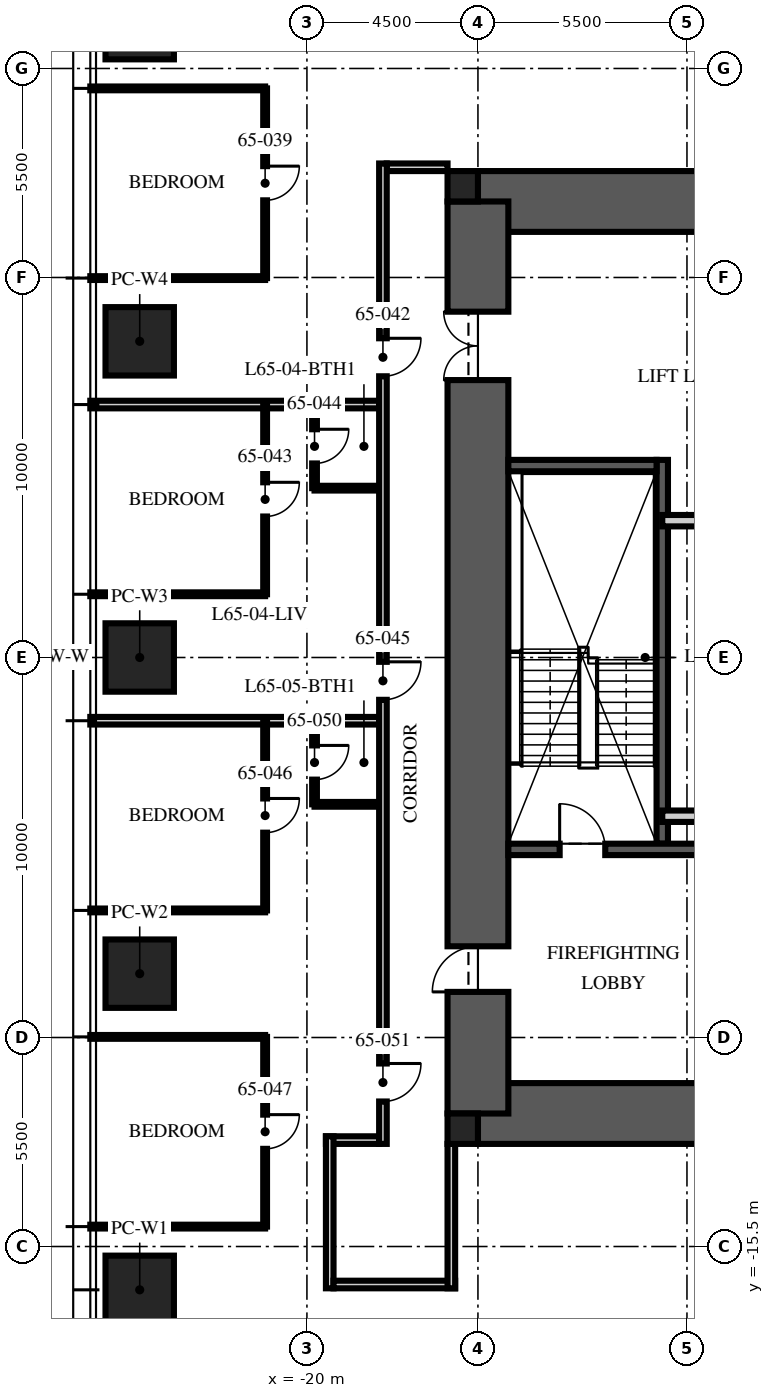
"""IFC4 building model, lengths in metres.
Left out: names, types, materials, properties, quantities, classifications, styles, units other than length and angle.
Written with IfcOpenShell. Run it as: python <this file> out.ifc"""

import sys

from ifc_helpers import new_model, si_unit, direction, frame, frame_2d, origin, origin_2d, place, context, subcontext, project, spatial, rectangle, extrude, element, fill, save


model = new_model("IFC4")
c1 = context("Model", 3, precision=1e-05, world=origin(), true_north=direction((0.0, 1.0)))
c2 = subcontext(c1, "Body", "Model", "MODEL_VIEW")
j1 = project(units=[si_unit("LENGTHUNIT", "METRE"), si_unit("PLANEANGLEUNIT", "RADIAN")], contexts=[c1])
p1 = place(None, origin())
s1 = spatial("IfcSite", under=j1, at=p1, CompositionType="ELEMENT")
p2 = place(p1, origin())
s2 = spatial("IfcBuilding", under=s1, at=p2, CompositionType="ELEMENT")
p3 = place(p2, frame((0.0, 0.0, 259.5)))
s3 = spatial("IfcBuildingStorey", under=s2, at=p3, CompositionType="ELEMENT", Elevation=259.5)
for number, where, z_axis, x_axis in (
    (1, (-15.5, 12.0, -0.25), (0.0, 0.0, 1.0), (1.0, 0.0, 0.0)),
    (2, (-15.5, -12.0, -0.25), (0.0, 0.0, 1.0), (1.0, 0.0, 0.0)),
):
    element("IfcWall", number, at=place(p3, frame(where, z_axis=z_axis, x_axis=x_axis)), inside=s3, PredefinedType="SHEAR", context=c2, shape_type="SweptSolid", body=[
        extrude(rectangle(XDim=31.0, YDim=1.6, at=frame_2d((15.5, 0.0))), origin(), (0.0, 0.0, 1.0), 3.75),
    ])
p4 = place(p3, frame((-15.5, -12.0, -0.25), z_axis=(0.0, 0.0, 1.0), x_axis=(0.0, 1.0, 0.0)))
e3 = element("IfcWall", 3, at=p4, inside=s3, PredefinedType="SHEAR", context=c2, shape_type="SweptSolid", body=[
    extrude(rectangle(XDim=24.0, YDim=1.6, at=frame_2d((12.0, 0.0))), origin(), (0.0, 0.0, 1.0), 3.75),
])
p5 = place(p4, frame((3.2, 0.0, 0.25)))
e4 = element("IfcOpeningElement", 4, at=p5, cuts=e3, PredefinedType="OPENING", context=c2, shape_type="SweptSolid", body=[
    extrude(rectangle(XDim=1.2, YDim=2.1, at=frame_2d((0.6, 1.05))), frame((0.0, 0.81, 0.0), z_axis=(0.0, -1.0, 0.0), x_axis=(1.0, 0.0, 0.0)), (0.0, 0.0, 1.0), 1.62),
])
p6 = place(p4, frame((19.3, 0.0, 0.25)))
e5 = element("IfcOpeningElement", 5, at=p6, cuts=e3, PredefinedType="OPENING", context=c2, shape_type="SweptSolid", body=[
    extrude(rectangle(XDim=1.8, YDim=2.1, at=frame_2d((0.9, 1.05))), frame((0.0, 0.81, 0.0), z_axis=(0.0, -1.0, 0.0), x_axis=(1.0, 0.0, 0.0)), (0.0, 0.0, 1.0), 1.62),
])
for number, where, z_axis, x_axis in (
    (6, (-15.9, 12.4, -0.25), (0.0, 0.0, 1.0), (1.0, 0.0, 0.0)),
    (7, (-15.9, -12.4, -0.25), (0.0, 0.0, 1.0), (1.0, 0.0, 0.0)),
):
    element("IfcColumn", number, at=place(p3, frame(where, z_axis=z_axis, x_axis=x_axis)), inside=s3, PredefinedType="COLUMN", context=c2, shape_type="SweptSolid", body=[
        extrude(rectangle(XDim=0.8, YDim=0.8, at=origin_2d()), origin(), (0.0, 0.0, 1.0), 3.75),
    ])
for number, where, z_axis, x_axis in (
    (8, (-24.4, -16.64, 0.0), (0.0, 0.0, 1.0), (0.0, 1.0, 0.0)),
    (9, (-24.4, -8.32, 0.0), (0.0, 0.0, 1.0), (0.0, 1.0, 0.0)),
    (10, (-24.4, 0.0, 0.0), (0.0, 0.0, 1.0), (0.0, 1.0, 0.0)),
    (11, (-24.4, 8.32, 0.0), (0.0, 0.0, 1.0), (0.0, 1.0, 0.0)),
    (12, (-24.4, 16.64, 0.0), (0.0, 0.0, 1.0), (0.0, 1.0, 0.0)),
):
    element("IfcColumn", number, at=place(p3, frame(where, z_axis=z_axis, x_axis=x_axis)), inside=s3, PredefinedType="COLUMN", context=c2, shape_type="SweptSolid", body=[
        extrude(rectangle(XDim=1.8, YDim=1.8, at=origin_2d()), origin(), (0.0, 0.0, 1.0), 3.75),
    ])
p7 = place(p3, frame((-10.65, -4.9, 0.0), z_axis=(0.0, 0.0, 1.0), x_axis=(0.0, 1.0, 0.0)))
e13 = element("IfcWall", 13, at=p7, inside=s3, PredefinedType="SOLIDWALL", context=c2, shape_type="SweptSolid", body=[
    extrude(rectangle(XDim=10.1, YDim=0.3, at=frame_2d((5.05, 0.0))), origin(), (0.0, 0.0, 1.0), 3.5),
])
p8 = place(p3, frame((-14.7, -5.05, 0.0), z_axis=(0.0, 0.0, 1.0), x_axis=(1.0, 0.0, 0.0)))
e14 = element("IfcWall", 14, at=p8, inside=s3, PredefinedType="SOLIDWALL", context=c2, shape_type="SweptSolid", body=[
    extrude(rectangle(XDim=5.9, YDim=0.3, at=frame_2d((2.95, 0.0))), origin(), (0.0, 0.0, 1.0), 3.5),
])
p9 = place(p8, frame((1.35, 0.0, 0.0)))
e15 = element("IfcOpeningElement", 15, at=p9, cuts=e14, PredefinedType="OPENING", context=c2, shape_type="SweptSolid", body=[
    extrude(rectangle(XDim=1.2, YDim=2.1, at=frame_2d((0.6, 1.05))), frame((0.0, 0.16, 0.0), z_axis=(0.0, -1.0, 0.0), x_axis=(1.0, 0.0, 0.0)), (0.0, 0.0, 1.0), 0.32),
])
p10 = place(p3, frame((-14.7, 5.05, 0.0), z_axis=(0.0, 0.0, 1.0), x_axis=(1.0, 0.0, 0.0)))
e16 = element("IfcWall", 16, at=p10, inside=s3, PredefinedType="SOLIDWALL", context=c2, shape_type="SweptSolid", body=[
    extrude(rectangle(XDim=3.9, YDim=0.3, at=frame_2d((1.95, 0.0))), origin(), (0.0, 0.0, 1.0), 3.5),
])
p11 = place(p3, frame((-10.65, 3.6, 0.0), z_axis=(0.0, 0.0, 1.0), x_axis=(1.0, 0.0, 0.0)))
e17 = element("IfcWall", 17, at=p11, inside=s3, PredefinedType="PARTITIONING", context=c2, shape_type="SweptSolid", body=[
    extrude(rectangle(XDim=21.3, YDim=0.3, at=frame_2d((10.65, 0.0))), origin(), (0.0, 0.0, 1.0), 3.5),
])
p12 = place(p11, frame((10.05, 0.0, 0.0)))
e18 = element("IfcOpeningElement", 18, at=p12, cuts=e17, PredefinedType="OPENING", context=c2, shape_type="SweptSolid", body=[
    extrude(rectangle(XDim=1.2, YDim=2.1, at=frame_2d((0.6, 1.05))), frame((0.0, 0.16, 0.0), z_axis=(0.0, -1.0, 0.0), x_axis=(1.0, 0.0, 0.0)), (0.0, 0.0, 1.0), 0.32),
])
p13 = place(p11, frame((19.238, 0.0, 0.0)))
e19 = element("IfcOpeningElement", 19, at=p13, cuts=e17, PredefinedType="OPENING", context=c2, shape_type="SweptSolid", body=[
    extrude(rectangle(XDim=0.9, YDim=2.1, at=frame_2d((0.45, 1.05))), frame((0.0, 0.16, 0.0), z_axis=(0.0, -1.0, 0.0), x_axis=(1.0, 0.0, 0.0)), (0.0, 0.0, 1.0), 0.32),
])
p14 = place(p3, frame((-10.65, -4.177, 0.0), z_axis=(0.0, 0.0, 1.0), x_axis=(1.0, 0.0, 0.0)))
e20 = element("IfcWall", 20, at=p14, inside=s3, PredefinedType="PARTITIONING", context=c2, shape_type="SweptSolid", body=[
    extrude(rectangle(XDim=6.45, YDim=0.3, at=frame_2d((3.225, 0.0))), origin(), (0.0, 0.0, 1.0), 3.5),
])
p15 = place(p3, frame((-18.1, -12.7, 0.0), z_axis=(0.0, 0.0, 1.0), x_axis=(-1.0, 0.0, 0.0)))
e21 = element("IfcWall", 21, at=p15, inside=s3, PredefinedType="PARTITIONING", context=c2, shape_type="SweptSolid", body=[
    extrude(rectangle(XDim=1.4, YDim=0.2, at=frame_2d((0.7, 0.0))), origin(), (0.0, 0.0, 1.0), 2.81),
])
p16 = place(p3, frame((-19.4, -12.6, 0.0), z_axis=(0.0, 0.0, 1.0), x_axis=(0.0, -1.0, 0.0)))
e22 = element("IfcWall", 22, at=p16, inside=s3, PredefinedType="PARTITIONING", context=c2, shape_type="SweptSolid", body=[
    extrude(rectangle(XDim=4.0, YDim=0.2, at=frame_2d((2.0, 0.0))), origin(), (0.0, 0.0, 1.0), 2.6),
])
p17 = place(p3, frame((-19.3, -16.5, 0.0), z_axis=(0.0, 0.0, 1.0), x_axis=(1.0, 0.0, 0.0)))
e23 = element("IfcWall", 23, at=p17, inside=s3, PredefinedType="PARTITIONING", context=c2, shape_type="SweptSolid", body=[
    extrude(rectangle(XDim=3.2, YDim=0.2, at=frame_2d((1.6, 0.0))), origin(), (0.0, 0.0, 1.0), 2.3),
])
p18 = place(p3, frame((-16.2, -16.6, 0.0), z_axis=(0.0, 0.0, 1.0), x_axis=(0.0, 1.0, 0.0)))
e24 = element("IfcWall", 24, at=p18, inside=s3, PredefinedType="PARTITIONING", context=c2, shape_type="SweptSolid", body=[
    extrude(rectangle(XDim=3.8, YDim=0.2, at=frame_2d((1.9, 0.0))), origin(), (0.0, 0.0, 1.0), 2.3),
])
p19 = place(p3, frame((-16.3, 12.9, 0.0), z_axis=(0.0, 0.0, 1.0), x_axis=(-1.0, 0.0, 0.0)))
e25 = element("IfcWall", 25, at=p19, inside=s3, PredefinedType="PARTITIONING", context=c2, shape_type="SweptSolid", body=[
    extrude(rectangle(XDim=1.6, YDim=0.2, at=frame_2d((0.8, 0.0))), origin(), (0.0, 0.0, 1.0), 2.3),
])
for number, where, z_axis, x_axis in (
    (26, (-21.1, 14.976, 0.0), (0.0, 0.0, 1.0), (-1.0, 0.0, 0.0)),
    (27, (-21.1, 9.984, 0.0), (0.0, 0.0, 1.0), (-1.0, 0.0, 0.0)),
):
    element("IfcWall", number, at=place(p3, frame(where, z_axis=z_axis, x_axis=x_axis)), inside=s3, PredefinedType="PARTITIONING", context=c2, shape_type="SweptSolid", body=[
        extrude(rectangle(XDim=4.6, YDim=0.1, at=frame_2d((2.3, 0.0))), origin(), (0.0, 0.0, 1.0), 2.91),
    ])
p20 = place(p3, frame((-18.1, 6.656, 0.0), z_axis=(0.0, 0.0, 1.0), x_axis=(-1.0, 0.0, 0.0)))
e28 = element("IfcWall", 28, at=p20, inside=s3, PredefinedType="PARTITIONING", context=c2, shape_type="SweptSolid", body=[
    extrude(rectangle(XDim=7.6, YDim=0.2, at=frame_2d((3.8, 0.0))), origin(), (0.0, 0.0, 1.0), 2.91),
])
p21 = place(p3, frame((-21.1, 1.664, 0.0), z_axis=(0.0, 0.0, 1.0), x_axis=(-1.0, 0.0, 0.0)))
e29 = element("IfcWall", 29, at=p21, inside=s3, PredefinedType="PARTITIONING", context=c2, shape_type="SweptSolid", body=[
    extrude(rectangle(XDim=4.6, YDim=0.1, at=frame_2d((2.3, 0.0))), origin(), (0.0, 0.0, 1.0), 2.91),
])
p22 = place(p3, frame((-18.1, -1.664, 0.0), z_axis=(0.0, 0.0, 1.0), x_axis=(-1.0, 0.0, 0.0)))
e30 = element("IfcWall", 30, at=p22, inside=s3, PredefinedType="PARTITIONING", context=c2, shape_type="SweptSolid", body=[
    extrude(rectangle(XDim=7.6, YDim=0.2, at=frame_2d((3.8, 0.0))), origin(), (0.0, 0.0, 1.0), 2.91),
])
for number, where, z_axis, x_axis in (
    (31, (-21.1, -6.656, 0.0), (0.0, 0.0, 1.0), (-1.0, 0.0, 0.0)),
    (32, (-21.1, -9.984, 0.0), (0.0, 0.0, 1.0), (-1.0, 0.0, 0.0)),
    (33, (-21.1, -14.976, 0.0), (0.0, 0.0, 1.0), (-1.0, 0.0, 0.0)),
):
    element("IfcWall", number, at=place(p3, frame(where, z_axis=z_axis, x_axis=x_axis)), inside=s3, PredefinedType="PARTITIONING", context=c2, shape_type="SweptSolid", body=[
        extrude(rectangle(XDim=4.6, YDim=0.1, at=frame_2d((2.3, 0.0))), origin(), (0.0, 0.0, 1.0), 2.91),
    ])
p23 = place(p3, frame((-21.1, 14.976, 0.0), z_axis=(0.0, 0.0, 1.0), x_axis=(0.0, -1.0, 0.0)))
e34 = element("IfcWall", 34, at=p23, inside=s3, PredefinedType="PARTITIONING", context=c2, shape_type="SweptSolid", body=[
    extrude(rectangle(XDim=4.992, YDim=0.1, at=frame_2d((2.496, 0.0))), origin(), (0.0, 0.0, 1.0), 2.81),
])
p24 = place(p23, frame((2.046, 0.0, 0.0)))
e35 = element("IfcOpeningElement", 35, at=p24, cuts=e34, PredefinedType="OPENING", context=c2, shape_type="SweptSolid", body=[
    extrude(rectangle(XDim=0.9, YDim=2.1, at=frame_2d((0.45, 1.05))), frame((0.0, 0.06, 0.0), z_axis=(0.0, -1.0, 0.0), x_axis=(1.0, 0.0, 0.0)), (0.0, 0.0, 1.0), 0.12),
])
p25 = place(p3, frame((-21.1, 6.656, 0.0), z_axis=(0.0, 0.0, 1.0), x_axis=(0.0, -1.0, 0.0)))
e36 = element("IfcWall", 36, at=p25, inside=s3, PredefinedType="PARTITIONING", context=c2, shape_type="SweptSolid", body=[
    extrude(rectangle(XDim=4.992, YDim=0.1, at=frame_2d((2.496, 0.0))), origin(), (0.0, 0.0, 1.0), 2.81),
])
p26 = place(p25, frame((2.046, 0.0, 0.0)))
e37 = element("IfcOpeningElement", 37, at=p26, cuts=e36, PredefinedType="OPENING", context=c2, shape_type="SweptSolid", body=[
    extrude(rectangle(XDim=0.9, YDim=2.1, at=frame_2d((0.45, 1.05))), frame((0.0, 0.06, 0.0), z_axis=(0.0, -1.0, 0.0), x_axis=(1.0, 0.0, 0.0)), (0.0, 0.0, 1.0), 0.12),
])
p27 = place(p3, frame((-19.8, 6.656, 0.0), z_axis=(0.0, 0.0, 1.0), x_axis=(0.0, -1.0, 0.0)))
e38 = element("IfcWall", 38, at=p27, inside=s3, PredefinedType="PARTITIONING", context=c2, shape_type="SweptSolid", body=[
    extrude(rectangle(XDim=2.2, YDim=0.125, at=frame_2d((1.1, 0.0))), origin(), (0.0, 0.0, 1.0), 3.5),
])
p28 = place(p27, frame((0.65, 0.0, 0.0)))
e39 = element("IfcOpeningElement", 39, at=p28, cuts=e38, PredefinedType="OPENING", context=c2, shape_type="SweptSolid", body=[
    extrude(rectangle(XDim=0.9, YDim=2.1, at=frame_2d((0.45, 1.05))), frame((0.0, 0.073, 0.0), z_axis=(0.0, -1.0, 0.0), x_axis=(1.0, 0.0, 0.0)), (0.0, 0.0, 1.0), 0.145),
])
p29 = place(p3, frame((-18.1, 4.456, 0.0), z_axis=(0.0, 0.0, 1.0), x_axis=(-1.0, 0.0, 0.0)))
e40 = element("IfcWall", 40, at=p29, inside=s3, PredefinedType="PARTITIONING", context=c2, shape_type="SweptSolid", body=[
    extrude(rectangle(XDim=1.7, YDim=0.125, at=frame_2d((0.85, 0.0))), origin(), (0.0, 0.0, 1.0), 3.5),
])
p30 = place(p3, frame((-21.1, -1.664, 0.0), z_axis=(0.0, 0.0, 1.0), x_axis=(0.0, -1.0, 0.0)))
e41 = element("IfcWall", 41, at=p30, inside=s3, PredefinedType="PARTITIONING", context=c2, shape_type="SweptSolid", body=[
    extrude(rectangle(XDim=4.992, YDim=0.1, at=frame_2d((2.496, 0.0))), origin(), (0.0, 0.0, 1.0), 2.81),
])
p31 = place(p30, frame((2.046, 0.0, 0.0)))
e42 = element("IfcOpeningElement", 42, at=p31, cuts=e41, PredefinedType="OPENING", context=c2, shape_type="SweptSolid", body=[
    extrude(rectangle(XDim=0.9, YDim=2.1, at=frame_2d((0.45, 1.05))), frame((0.0, 0.06, 0.0), z_axis=(0.0, -1.0, 0.0), x_axis=(1.0, 0.0, 0.0)), (0.0, 0.0, 1.0), 0.12),
])
p32 = place(p3, frame((-21.1, -9.984, 0.0), z_axis=(0.0, 0.0, 1.0), x_axis=(0.0, -1.0, 0.0)))
e43 = element("IfcWall", 43, at=p32, inside=s3, PredefinedType="PARTITIONING", context=c2, shape_type="SweptSolid", body=[
    extrude(rectangle(XDim=4.992, YDim=0.1, at=frame_2d((2.496, 0.0))), origin(), (0.0, 0.0, 1.0), 2.81),
])
p33 = place(p32, frame((2.046, 0.0, 0.0)))
e44 = element("IfcOpeningElement", 44, at=p33, cuts=e43, PredefinedType="OPENING", context=c2, shape_type="SweptSolid", body=[
    extrude(rectangle(XDim=0.9, YDim=2.1, at=frame_2d((0.45, 1.05))), frame((0.0, 0.06, 0.0), z_axis=(0.0, -1.0, 0.0), x_axis=(1.0, 0.0, 0.0)), (0.0, 0.0, 1.0), 0.12),
])
p34 = place(p3, frame((-19.8, -1.664, 0.0), z_axis=(0.0, 0.0, 1.0), x_axis=(0.0, -1.0, 0.0)))
e45 = element("IfcWall", 45, at=p34, inside=s3, PredefinedType="PARTITIONING", context=c2, shape_type="SweptSolid", body=[
    extrude(rectangle(XDim=2.2, YDim=0.125, at=frame_2d((1.1, 0.0))), origin(), (0.0, 0.0, 1.0), 3.5),
])
p35 = place(p34, frame((0.65, 0.0, 0.0)))
e46 = element("IfcOpeningElement", 46, at=p35, cuts=e45, PredefinedType="OPENING", context=c2, shape_type="SweptSolid", body=[
    extrude(rectangle(XDim=0.9, YDim=2.1, at=frame_2d((0.45, 1.05))), frame((0.0, 0.073, 0.0), z_axis=(0.0, -1.0, 0.0), x_axis=(1.0, 0.0, 0.0)), (0.0, 0.0, 1.0), 0.145),
])
p36 = place(p3, frame((-18.1, -3.864, 0.0), z_axis=(0.0, 0.0, 1.0), x_axis=(-1.0, 0.0, 0.0)))
e47 = element("IfcWall", 47, at=p36, inside=s3, PredefinedType="PARTITIONING", context=c2, shape_type="SweptSolid", body=[
    extrude(rectangle(XDim=1.7, YDim=0.125, at=frame_2d((0.85, 0.0))), origin(), (0.0, 0.0, 1.0), 3.5),
])
p37 = place(p3, frame((-18.0, 13.0, 0.0), z_axis=(0.0, 0.0, 1.0), x_axis=(0.0, -1.0, 0.0)))
e48 = element("IfcWall", 48, at=p37, inside=s3, PredefinedType="PARTITIONING", context=c2, shape_type="SweptSolid", body=[
    extrude(rectangle(XDim=25.8, YDim=0.2, at=frame_2d((12.9, 0.0))), origin(), (0.0, 0.0, 1.0), 2.6),
])
p38 = place(p37, frame((4.6, 0.0, 0.0)))
e49 = element("IfcOpeningElement", 49, at=p38, cuts=e48, PredefinedType="OPENING", context=c2, shape_type="SweptSolid", body=[
    extrude(rectangle(XDim=1.0, YDim=2.2, at=frame_2d((0.5, 1.1))), frame((0.0, 0.11, 0.0), z_axis=(0.0, -1.0, 0.0), x_axis=(1.0, 0.0, 0.0)), (0.0, 0.0, 1.0), 0.22),
])
p39 = place(p37, frame((13.114, 0.0, 0.0)))
e50 = element("IfcOpeningElement", 50, at=p39, cuts=e48, PredefinedType="OPENING", context=c2, shape_type="SweptSolid", body=[
    extrude(rectangle(XDim=1.0, YDim=2.2, at=frame_2d((0.5, 1.1))), frame((0.0, 0.11, 0.0), z_axis=(0.0, -1.0, 0.0), x_axis=(1.0, 0.0, 0.0)), (0.0, 0.0, 1.0), 0.22),
])
p40 = place(p37, frame((23.684, 0.0, 0.0)))
e51 = element("IfcOpeningElement", 51, at=p40, cuts=e48, PredefinedType="OPENING", context=c2, shape_type="SweptSolid", body=[
    extrude(rectangle(XDim=1.0, YDim=2.2, at=frame_2d((0.5, 1.1))), frame((0.0, 0.11, 0.0), z_axis=(0.0, -1.0, 0.0), x_axis=(1.0, 0.0, 0.0)), (0.0, 0.0, 1.0), 0.22),
])
p41 = place(p9, origin())
e52 = element("IfcDoor", 52, at=p41, inside=s3, OperationType="SINGLE_SWING_LEFT", PredefinedType="DOOR", context=c2, shape_type="SweptSolid", body=[
    extrude(rectangle(XDim=1.2, YDim=2.1, at=frame_2d((0.6, 1.05))), frame((0.0, 0.025, 0.0), z_axis=(0.0, -1.0, 0.0), x_axis=(1.0, 0.0, 0.0)), (0.0, 0.0, 1.0), 0.05),
])
fill(e15, e52)
p42 = place(p5, origin())
e53 = element("IfcDoor", 53, at=p42, inside=s3, OperationType="SINGLE_SWING_LEFT", PredefinedType="DOOR", context=c2, shape_type="SweptSolid", body=[
    extrude(rectangle(XDim=1.2, YDim=2.1, at=frame_2d((0.6, 1.05))), frame((0.0, 0.025, 0.0), z_axis=(0.0, -1.0, 0.0), x_axis=(1.0, 0.0, 0.0)), (0.0, 0.0, 1.0), 0.05),
])
fill(e4, e53)
p43 = place(p6, origin())
e54 = element("IfcDoor", 54, at=p43, inside=s3, OperationType="DOUBLE_DOOR_SINGLE_SWING", PredefinedType="DOOR", context=c2, shape_type="SweptSolid", body=[
    extrude(rectangle(XDim=1.8, YDim=2.1, at=frame_2d((0.9, 1.05))), frame((0.0, 0.025, 0.0), z_axis=(0.0, -1.0, 0.0), x_axis=(1.0, 0.0, 0.0)), (0.0, 0.0, 1.0), 0.05),
])
fill(e5, e54)
p44 = place(p24, origin())
e55 = element("IfcDoor", 55, at=p44, inside=s3, OperationType="SINGLE_SWING_LEFT", PredefinedType="DOOR", context=c2, shape_type="SweptSolid", body=[
    extrude(rectangle(XDim=0.9, YDim=2.1, at=frame_2d((0.45, 1.05))), frame((0.0, 0.025, 0.0), z_axis=(0.0, -1.0, 0.0), x_axis=(1.0, 0.0, 0.0)), (0.0, 0.0, 1.0), 0.05),
])
fill(e35, e55)
p45 = place(p38, origin())
e56 = element("IfcDoor", 56, at=p45, inside=s3, OperationType="SINGLE_SWING_LEFT", PredefinedType="DOOR", context=c2, shape_type="SweptSolid", body=[
    extrude(rectangle(XDim=1.0, YDim=2.2, at=frame_2d((0.5, 1.1))), frame((0.0, 0.025, 0.0), z_axis=(0.0, -1.0, 0.0), x_axis=(1.0, 0.0, 0.0)), (0.0, 0.0, 1.0), 0.05),
])
fill(e49, e56)
p46 = place(p26, origin())
e57 = element("IfcDoor", 57, at=p46, inside=s3, OperationType="SINGLE_SWING_LEFT", PredefinedType="DOOR", context=c2, shape_type="SweptSolid", body=[
    extrude(rectangle(XDim=0.9, YDim=2.1, at=frame_2d((0.45, 1.05))), frame((0.0, 0.025, 0.0), z_axis=(0.0, -1.0, 0.0), x_axis=(1.0, 0.0, 0.0)), (0.0, 0.0, 1.0), 0.05),
])
fill(e37, e57)
p47 = place(p28, origin())
e58 = element("IfcDoor", 58, at=p47, inside=s3, OperationType="SINGLE_SWING_LEFT", PredefinedType="DOOR", context=c2, shape_type="SweptSolid", body=[
    extrude(rectangle(XDim=0.9, YDim=2.1, at=frame_2d((0.45, 1.05))), frame((0.0, 0.025, 0.0), z_axis=(0.0, -1.0, 0.0), x_axis=(1.0, 0.0, 0.0)), (0.0, 0.0, 1.0), 0.05),
])
fill(e39, e58)
p48 = place(p39, origin())
e59 = element("IfcDoor", 59, at=p48, inside=s3, OperationType="SINGLE_SWING_LEFT", PredefinedType="DOOR", context=c2, shape_type="SweptSolid", body=[
    extrude(rectangle(XDim=1.0, YDim=2.2, at=frame_2d((0.5, 1.1))), frame((0.0, 0.025, 0.0), z_axis=(0.0, -1.0, 0.0), x_axis=(1.0, 0.0, 0.0)), (0.0, 0.0, 1.0), 0.05),
])
fill(e50, e59)
p49 = place(p31, origin())
e60 = element("IfcDoor", 60, at=p49, inside=s3, OperationType="SINGLE_SWING_LEFT", PredefinedType="DOOR", context=c2, shape_type="SweptSolid", body=[
    extrude(rectangle(XDim=0.9, YDim=2.1, at=frame_2d((0.45, 1.05))), frame((0.0, 0.025, 0.0), z_axis=(0.0, -1.0, 0.0), x_axis=(1.0, 0.0, 0.0)), (0.0, 0.0, 1.0), 0.05),
])
fill(e42, e60)
p50 = place(p33, origin())
e61 = element("IfcDoor", 61, at=p50, inside=s3, OperationType="SINGLE_SWING_LEFT", PredefinedType="DOOR", context=c2, shape_type="SweptSolid", body=[
    extrude(rectangle(XDim=0.9, YDim=2.1, at=frame_2d((0.45, 1.05))), frame((0.0, 0.025, 0.0), z_axis=(0.0, -1.0, 0.0), x_axis=(1.0, 0.0, 0.0)), (0.0, 0.0, 1.0), 0.05),
])
fill(e44, e61)
p51 = place(p35, origin())
e62 = element("IfcDoor", 62, at=p51, inside=s3, OperationType="SINGLE_SWING_LEFT", PredefinedType="DOOR", context=c2, shape_type="SweptSolid", body=[
    extrude(rectangle(XDim=0.9, YDim=2.1, at=frame_2d((0.45, 1.05))), frame((0.0, 0.025, 0.0), z_axis=(0.0, -1.0, 0.0), x_axis=(1.0, 0.0, 0.0)), (0.0, 0.0, 1.0), 0.05),
])
fill(e46, e62)
p52 = place(p40, origin())
e63 = element("IfcDoor", 63, at=p52, inside=s3, OperationType="SINGLE_SWING_LEFT", PredefinedType="DOOR", context=c2, shape_type="SweptSolid", body=[
    extrude(rectangle(XDim=1.0, YDim=2.2, at=frame_2d((0.5, 1.1))), frame((0.0, 0.025, 0.0), z_axis=(0.0, -1.0, 0.0), x_axis=(1.0, 0.0, 0.0)), (0.0, 0.0, 1.0), 0.05),
])
fill(e51, e63)
save(model, sys.argv[1])
